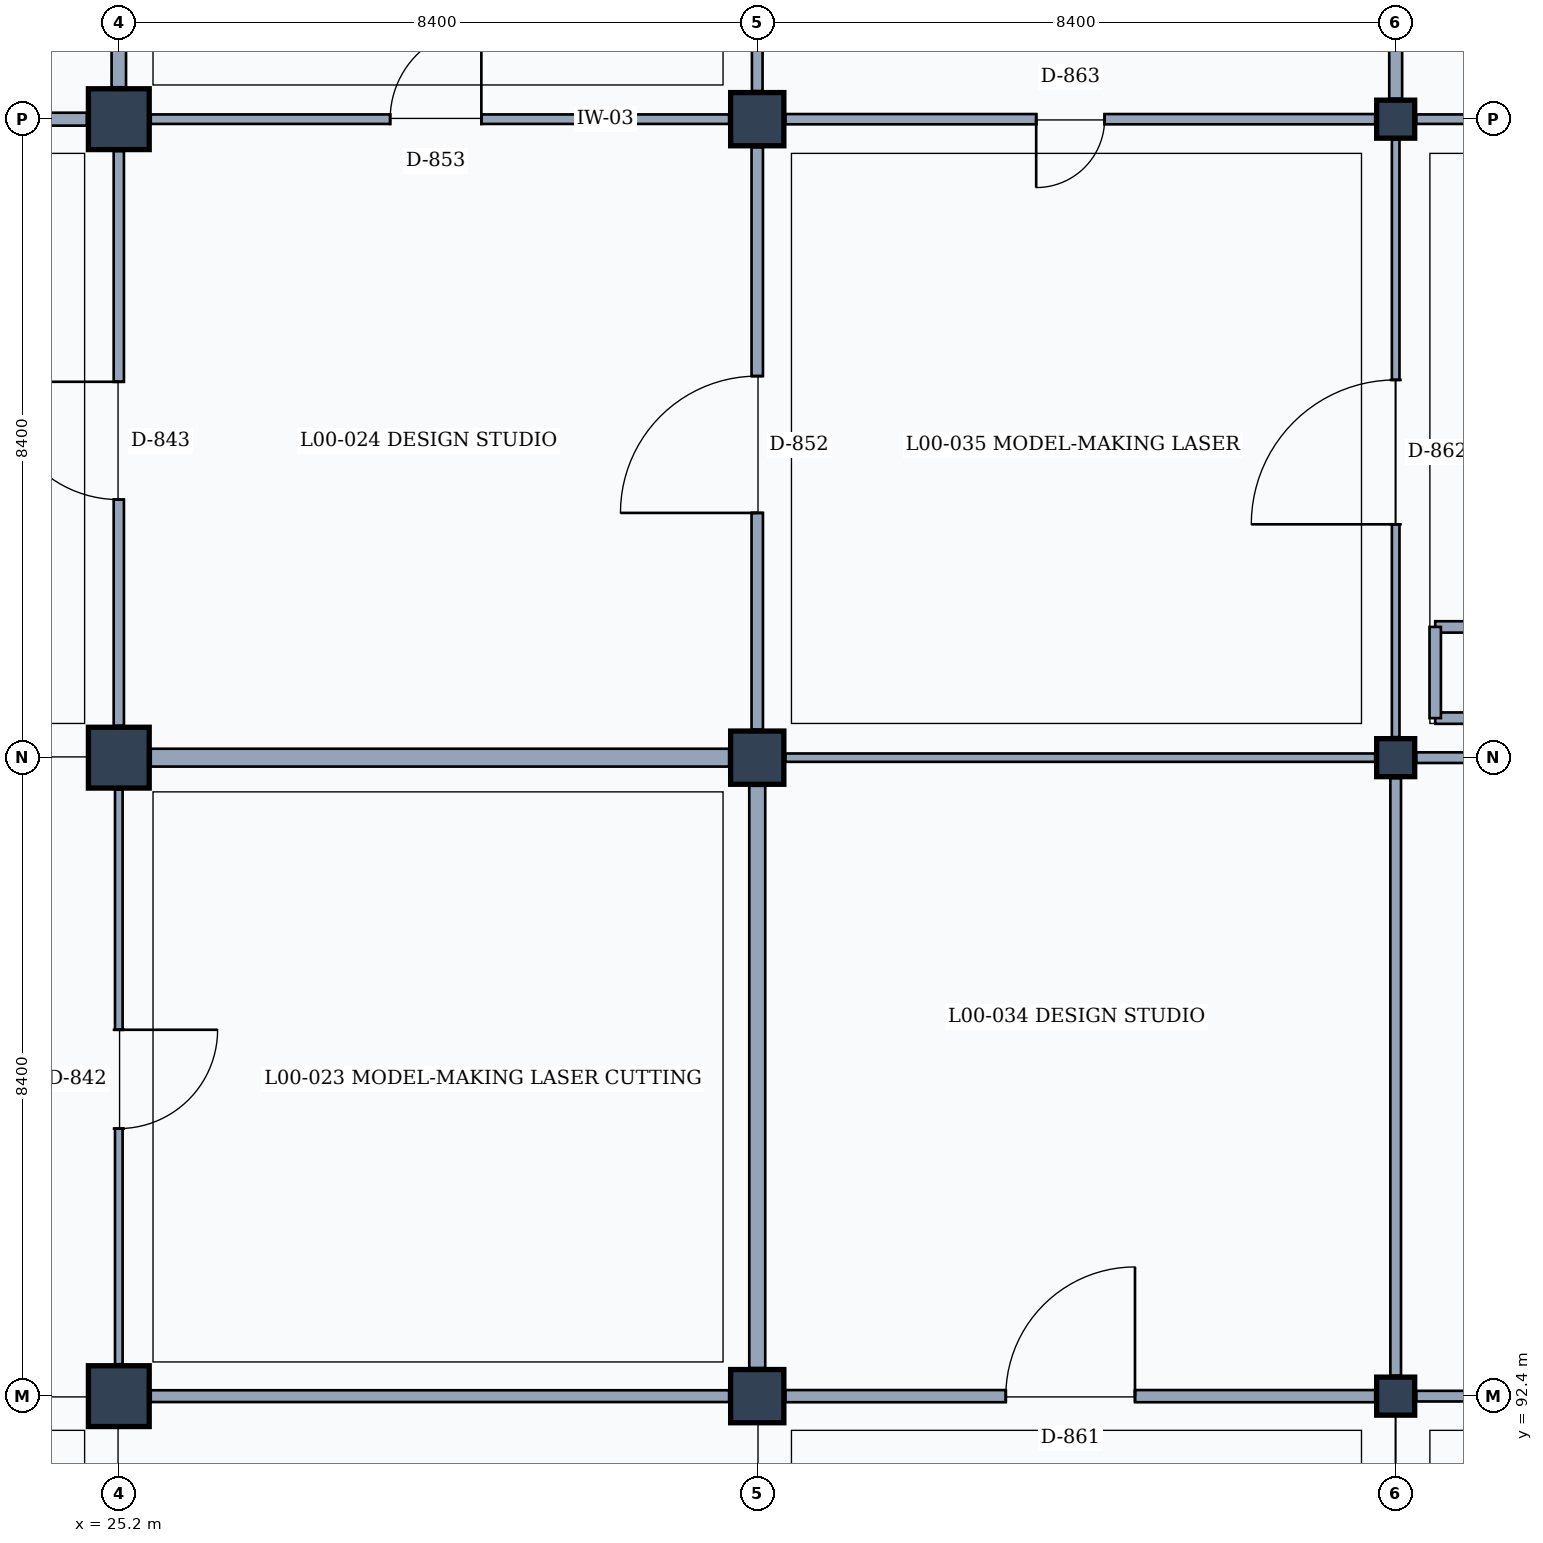
"""IFC4 building model, lengths in metres.
Left out: names, types, materials, properties, quantities, classifications, styles, units other than length and angle.
Written with IfcOpenShell. Run it as: python <this file> out.ifc"""

import sys

from ifc_helpers import new_model, si_unit, direction, frame, frame_2d, origin, origin_2d, place, context, subcontext, project, spatial, rectangle, extrude, element, fill, save


model = new_model("IFC4")
c1 = context("Model", 3, precision=1e-05, world=origin(), true_north=direction((0.0, 1.0)))
c2 = subcontext(c1, "Body", "Model", "MODEL_VIEW")
j1 = project(units=[si_unit("LENGTHUNIT", "METRE"), si_unit("PLANEANGLEUNIT", "RADIAN")], contexts=[c1])
p1 = place(None, origin())
s1 = spatial("IfcSite", under=j1, at=p1, CompositionType="ELEMENT")
p2 = place(p1, origin())
s2 = spatial("IfcBuilding", under=s1, at=p2, CompositionType="ELEMENT")
p3 = place(p2, origin())
s3 = spatial("IfcBuildingStorey", under=s2, at=p3, CompositionType="ELEMENT", Elevation=0.0)
for number, where, z_axis, x_axis in (
    (1, (25.2, 92.4, 0.0), (0.0, 0.0, 1.0), (1.0, 0.0, 0.0)),
    (2, (25.2, 100.8, 0.0), (0.0, 0.0, 1.0), (1.0, 0.0, 0.0)),
    (3, (25.2, 109.2, 0.0), (0.0, 0.0, 1.0), (1.0, 0.0, 0.0)),
):
    element("IfcColumn", number, at=place(p3, frame(where, z_axis=z_axis, x_axis=x_axis)), inside=s3, PredefinedType="COLUMN", context=c2, shape_type="SweptSolid", body=[
        extrude(rectangle(XDim=0.8, YDim=0.8, at=origin_2d()), origin(), (0.0, 0.0, 1.0), 4.8),
    ])
for number, where, z_axis, x_axis in (
    (4, (33.6, 92.4, 0.0), (0.0, 0.0, 1.0), (1.0, 0.0, 0.0)),
    (5, (33.6, 100.8, 0.0), (0.0, 0.0, 1.0), (1.0, 0.0, 0.0)),
    (6, (33.6, 109.2, 0.0), (0.0, 0.0, 1.0), (1.0, 0.0, 0.0)),
):
    element("IfcColumn", number, at=place(p3, frame(where, z_axis=z_axis, x_axis=x_axis)), inside=s3, PredefinedType="COLUMN", context=c2, shape_type="SweptSolid", body=[
        extrude(rectangle(XDim=0.7, YDim=0.7, at=origin_2d()), origin(), (0.0, 0.0, 1.0), 4.8),
    ])
for number, where, z_axis, x_axis in (
    (7, (42.0, 92.4, 0.0), (0.0, 0.0, 1.0), (1.0, 0.0, 0.0)),
    (8, (42.0, 100.8, 0.0), (0.0, 0.0, 1.0), (1.0, 0.0, 0.0)),
    (9, (42.0, 109.2, 0.0), (0.0, 0.0, 1.0), (1.0, 0.0, 0.0)),
):
    element("IfcColumn", number, at=place(p3, frame(where, z_axis=z_axis, x_axis=x_axis)), inside=s3, PredefinedType="COLUMN", context=c2, shape_type="SweptSolid", body=[
        extrude(rectangle(XDim=0.5, YDim=0.5, at=origin_2d()), origin(), (0.0, 0.0, 1.0), 4.8),
    ])
for number, where, z_axis, x_axis in (
    (10, (42.52, 101.32, 0.0), (0.0, 0.0, 1.0), (1.0, 0.0, 0.0)),
    (11, (43.72, 102.52, 0.0), (0.0, 0.0, 1.0), (-1.0, 0.0, 0.0)),
    (12, (42.52, 102.52, 0.0), (0.0, 0.0, 1.0), (0.0, -1.0, 0.0)),
):
    element("IfcWall", number, at=place(p3, frame(where, z_axis=z_axis, x_axis=x_axis)), inside=s3, PredefinedType="PARTITIONING", context=c2, shape_type="SweptSolid", body=[
        extrude(rectangle(XDim=1.2, YDim=0.15, at=frame_2d((0.6, 0.0))), origin(), (0.0, 0.0, 1.0), 4.55),
    ])
p4 = place(p3, frame((25.2, 92.82, 0.0), z_axis=(0.0, 0.0, 1.0), x_axis=(0.0, 1.0, 0.0)))
e13 = element("IfcWall", 13, at=p4, inside=s3, PredefinedType="MOVABLE", context=c2, shape_type="SweptSolid", body=[
    extrude(rectangle(XDim=7.56, YDim=0.1, at=frame_2d((3.78, 0.0))), origin(), (0.0, 0.0, 1.0), 3.92),
])
p5 = place(p4, frame((3.1, 0.0, 0.0)))
e14 = element("IfcOpeningElement", 14, at=p5, cuts=e13, PredefinedType="OPENING", context=c2, shape_type="SweptSolid", body=[
    extrude(rectangle(XDim=1.3, YDim=2.2, at=frame_2d((0.65, 1.1))), frame((0.0, 0.06, 0.0), z_axis=(0.0, -1.0, 0.0), x_axis=(1.0, 0.0, 0.0)), (0.0, 0.0, 1.0), 0.12),
])
p6 = place(p3, frame((25.2, 101.22, 0.0), z_axis=(0.0, 0.0, 1.0), x_axis=(0.0, 1.0, 0.0)))
e15 = element("IfcWall", 15, at=p6, inside=s3, PredefinedType="PARTITIONING", context=c2, shape_type="SweptSolid", body=[
    extrude(rectangle(XDim=7.56, YDim=0.135, at=frame_2d((3.78, 0.0))), origin(), (0.0, 0.0, 1.0), 3.92),
])
p7 = place(p6, frame((2.975, 0.0, 0.0)))
e16 = element("IfcOpeningElement", 16, at=p7, cuts=e15, PredefinedType="OPENING", context=c2, shape_type="SweptSolid", body=[
    extrude(rectangle(XDim=1.55, YDim=2.35, at=frame_2d((0.775, 1.175))), frame((0.0, 0.077, 0.0), z_axis=(0.0, -1.0, 0.0), x_axis=(1.0, 0.0, 0.0)), (0.0, 0.0, 1.0), 0.155),
])
p8 = place(p3, frame((17.245, 109.2, 0.0), z_axis=(0.0, 0.0, 1.0), x_axis=(1.0, 0.0, 0.0)))
e17 = element("IfcWall", 17, at=p8, inside=s3, PredefinedType="PARTITIONING", context=c2, shape_type="SweptSolid", body=[
    extrude(rectangle(XDim=7.535, YDim=0.17, at=frame_2d((3.768, 0.0))), origin(), (0.0, 0.0, 1.0), 3.87),
])
p9 = place(p8, frame((2.9, 0.0, 0.0)))
e18 = element("IfcOpeningElement", 18, at=p9, cuts=e17, PredefinedType="OPENING", context=c2, shape_type="SweptSolid", body=[
    extrude(rectangle(XDim=1.7, YDim=2.3, at=frame_2d((0.85, 1.15))), frame((0.0, 0.095, 0.0), z_axis=(0.0, -1.0, 0.0), x_axis=(1.0, 0.0, 0.0)), (0.0, 0.0, 1.0), 0.19),
])
p10 = place(p3, frame((25.2, 109.62, 0.0), z_axis=(0.0, 0.0, 1.0), x_axis=(0.0, 1.0, 0.0)))
e19 = element("IfcWall", 19, at=p10, inside=s3, PredefinedType="PARTITIONING", context=c2, shape_type="SweptSolid", body=[
    extrude(rectangle(XDim=7.56, YDim=0.19, at=frame_2d((3.78, 0.0))), origin(), (0.0, 0.0, 1.0), 3.92),
])
p11 = place(p3, frame((25.62, 92.4, 0.0), z_axis=(0.0, 0.0, 1.0), x_axis=(1.0, 0.0, 0.0)))
e20 = element("IfcWall", 20, at=p11, inside=s3, PredefinedType="PARTITIONING", context=c2, shape_type="SweptSolid", body=[
    extrude(rectangle(XDim=7.61, YDim=0.155, at=frame_2d((3.805, 0.0))), origin(), (0.0, 0.0, 1.0), 3.87),
])
p12 = place(p3, frame((33.6, 92.77, 0.0), z_axis=(0.0, 0.0, 1.0), x_axis=(0.0, 1.0, 0.0)))
e21 = element("IfcWall", 21, at=p12, inside=s3, PredefinedType="PARTITIONING", context=c2, shape_type="SweptSolid", body=[
    extrude(rectangle(XDim=7.66, YDim=0.21, at=frame_2d((3.83, 0.0))), origin(), (0.0, 0.0, 1.0), 3.92),
])
p13 = place(p3, frame((25.62, 100.8, 0.0), z_axis=(0.0, 0.0, 1.0), x_axis=(1.0, 0.0, 0.0)))
e22 = element("IfcWall", 22, at=p13, inside=s3, PredefinedType="PARTITIONING", context=c2, shape_type="SweptSolid", body=[
    extrude(rectangle(XDim=7.61, YDim=0.235, at=frame_2d((3.805, 0.0))), origin(), (0.0, 0.0, 1.0), 3.87),
])
p14 = place(p3, frame((33.6, 101.17, 0.0), z_axis=(0.0, 0.0, 1.0), x_axis=(0.0, 1.0, 0.0)))
e23 = element("IfcWall", 23, at=p14, inside=s3, PredefinedType="PARTITIONING", context=c2, shape_type="SweptSolid", body=[
    extrude(rectangle(XDim=7.66, YDim=0.15, at=frame_2d((3.83, 0.0))), origin(), (0.0, 0.0, 1.0), 3.92),
])
p15 = place(p14, frame((2.85, 0.0, 0.0)))
e24 = element("IfcOpeningElement", 24, at=p15, cuts=e23, PredefinedType="OPENING", context=c2, shape_type="SweptSolid", body=[
    extrude(rectangle(XDim=1.8, YDim=2.3, at=frame_2d((0.9, 1.15))), frame((0.0, 0.085, 0.0), z_axis=(0.0, -1.0, 0.0), x_axis=(1.0, 0.0, 0.0)), (0.0, 0.0, 1.0), 0.17),
])
p16 = place(p3, frame((25.62, 109.2, 0.0), z_axis=(0.0, 0.0, 1.0), x_axis=(1.0, 0.0, 0.0)))
e25 = element("IfcWall", 25, at=p16, inside=s3, PredefinedType="PARTITIONING", context=c2, shape_type="SweptSolid", body=[
    extrude(rectangle(XDim=7.61, YDim=0.125, at=frame_2d((3.805, 0.0))), origin(), (0.0, 0.0, 1.0), 3.87),
])
p17 = place(p16, frame((3.15, 0.0, 0.0)))
e26 = element("IfcOpeningElement", 26, at=p17, cuts=e25, PredefinedType="OPENING", context=c2, shape_type="SweptSolid", body=[
    extrude(rectangle(XDim=1.2, YDim=2.2, at=frame_2d((0.6, 1.1))), frame((0.0, 0.073, 0.0), z_axis=(0.0, -1.0, 0.0), x_axis=(1.0, 0.0, 0.0)), (0.0, 0.0, 1.0), 0.145),
])
p18 = place(p3, frame((33.6, 109.57, 0.0), z_axis=(0.0, 0.0, 1.0), x_axis=(0.0, 1.0, 0.0)))
e27 = element("IfcWall", 27, at=p18, inside=s3, PredefinedType="PARTITIONING", context=c2, shape_type="SweptSolid", body=[
    extrude(rectangle(XDim=7.66, YDim=0.14, at=frame_2d((3.83, 0.0))), origin(), (0.0, 0.0, 1.0), 3.92),
])
p19 = place(p3, frame((33.97, 92.4, 0.0), z_axis=(0.0, 0.0, 1.0), x_axis=(1.0, 0.0, 0.0)))
e28 = element("IfcWall", 28, at=p19, inside=s3, PredefinedType="PARTITIONING", context=c2, shape_type="SweptSolid", body=[
    extrude(rectangle(XDim=7.76, YDim=0.16, at=frame_2d((3.88, 0.0))), origin(), (0.0, 0.0, 1.0), 3.87),
])
p20 = place(p19, frame((2.9, 0.0, 0.0)))
e29 = element("IfcOpeningElement", 29, at=p20, cuts=e28, PredefinedType="OPENING", context=c2, shape_type="SweptSolid", body=[
    extrude(rectangle(XDim=1.7, YDim=2.3, at=frame_2d((0.85, 1.15))), frame((0.0, 0.09, 0.0), z_axis=(0.0, -1.0, 0.0), x_axis=(1.0, 0.0, 0.0)), (0.0, 0.0, 1.0), 0.18),
])
p21 = place(p3, frame((42.0, 92.67, 0.0), z_axis=(0.0, 0.0, 1.0), x_axis=(0.0, 1.0, 0.0)))
e30 = element("IfcWall", 30, at=p21, inside=s3, PredefinedType="PARTITIONING", context=c2, shape_type="SweptSolid", body=[
    extrude(rectangle(XDim=7.86, YDim=0.14, at=frame_2d((3.93, 0.0))), origin(), (0.0, 0.0, 1.0), 3.92),
])
p22 = place(p3, frame((33.97, 100.8, 0.0), z_axis=(0.0, 0.0, 1.0), x_axis=(1.0, 0.0, 0.0)))
e31 = element("IfcWall", 31, at=p22, inside=s3, PredefinedType="PARTITIONING", context=c2, shape_type="SweptSolid", body=[
    extrude(rectangle(XDim=7.76, YDim=0.11, at=frame_2d((3.88, 0.0))), origin(), (0.0, 0.0, 1.0), 3.87),
])
p23 = place(p3, frame((42.0, 101.07, 0.0), z_axis=(0.0, 0.0, 1.0), x_axis=(0.0, 1.0, 0.0)))
e32 = element("IfcWall", 32, at=p23, inside=s3, PredefinedType="MOVABLE", context=c2, shape_type="SweptSolid", body=[
    extrude(rectangle(XDim=7.86, YDim=0.1, at=frame_2d((3.93, 0.0))), origin(), (0.0, 0.0, 1.0), 3.92),
])
p24 = place(p23, frame((2.8, 0.0, 0.0)))
e33 = element("IfcOpeningElement", 33, at=p24, cuts=e32, PredefinedType="OPENING", context=c2, shape_type="SweptSolid", body=[
    extrude(rectangle(XDim=1.9, YDim=2.4, at=frame_2d((0.95, 1.2))), frame((0.0, 0.06, 0.0), z_axis=(0.0, -1.0, 0.0), x_axis=(1.0, 0.0, 0.0)), (0.0, 0.0, 1.0), 0.12),
])
p25 = place(p3, frame((33.97, 109.2, 0.0), z_axis=(0.0, 0.0, 1.0), x_axis=(1.0, 0.0, 0.0)))
e34 = element("IfcWall", 34, at=p25, inside=s3, PredefinedType="PARTITIONING", context=c2, shape_type="SweptSolid", body=[
    extrude(rectangle(XDim=7.76, YDim=0.135, at=frame_2d((3.88, 0.0))), origin(), (0.0, 0.0, 1.0), 3.87),
])
p26 = place(p25, frame((3.3, 0.0, 0.0)))
e35 = element("IfcOpeningElement", 35, at=p26, cuts=e34, PredefinedType="OPENING", context=c2, shape_type="SweptSolid", body=[
    extrude(rectangle(XDim=0.9, YDim=2.1, at=frame_2d((0.45, 1.05))), frame((0.0, 0.077, 0.0), z_axis=(0.0, -1.0, 0.0), x_axis=(1.0, 0.0, 0.0)), (0.0, 0.0, 1.0), 0.155),
])
p27 = place(p3, frame((42.0, 109.47, 0.0), z_axis=(0.0, 0.0, 1.0), x_axis=(0.0, 1.0, 0.0)))
e36 = element("IfcWall", 36, at=p27, inside=s3, PredefinedType="PARTITIONING", context=c2, shape_type="SweptSolid", body=[
    extrude(rectangle(XDim=7.86, YDim=0.17, at=frame_2d((3.93, 0.0))), origin(), (0.0, 0.0, 1.0), 3.92),
])
p28 = place(p3, frame((42.27, 92.4, 0.0), z_axis=(0.0, 0.0, 1.0), x_axis=(1.0, 0.0, 0.0)))
e37 = element("IfcWall", 37, at=p28, inside=s3, PredefinedType="PARTITIONING", context=c2, shape_type="SweptSolid", body=[
    extrude(rectangle(XDim=7.685, YDim=0.14, at=frame_2d((3.843, 0.0))), origin(), (0.0, 0.0, 1.0), 3.86),
])
p29 = place(p28, frame((3.275, 0.0, 0.0)))
e38 = element("IfcOpeningElement", 38, at=p29, cuts=e37, PredefinedType="OPENING", context=c2, shape_type="SweptSolid", body=[
    extrude(rectangle(XDim=0.95, YDim=2.15, at=frame_2d((0.475, 1.075))), frame((0.0, 0.08, 0.0), z_axis=(0.0, -1.0, 0.0), x_axis=(1.0, 0.0, 0.0)), (0.0, 0.0, 1.0), 0.16),
])
p30 = place(p3, frame((42.27, 100.8, 0.0), z_axis=(0.0, 0.0, 1.0), x_axis=(1.0, 0.0, 0.0)))
e39 = element("IfcWall", 39, at=p30, inside=s3, PredefinedType="PARTITIONING", context=c2, shape_type="SweptSolid", body=[
    extrude(rectangle(XDim=7.685, YDim=0.14, at=frame_2d((3.843, 0.0))), origin(), (0.0, 0.0, 1.0), 3.86),
])
p31 = place(p3, frame((42.27, 109.2, 0.0), z_axis=(0.0, 0.0, 1.0), x_axis=(1.0, 0.0, 0.0)))
e40 = element("IfcWall", 40, at=p31, inside=s3, PredefinedType="PARTITIONING", context=c2, shape_type="SweptSolid", body=[
    extrude(rectangle(XDim=7.81, YDim=0.125, at=frame_2d((3.905, 0.0))), origin(), (0.0, 0.0, 1.0), 3.86),
])
p32 = place(p31, frame((3.275, 0.0, 0.0)))
e41 = element("IfcOpeningElement", 41, at=p32, cuts=e40, PredefinedType="OPENING", context=c2, shape_type="SweptSolid", body=[
    extrude(rectangle(XDim=0.95, YDim=2.15, at=frame_2d((0.475, 1.075))), frame((0.0, 0.073, 0.0), z_axis=(0.0, -1.0, 0.0), x_axis=(1.0, 0.0, 0.0)), (0.0, 0.0, 1.0), 0.145),
])
p33 = place(p5, frame((1.3, 0.0, 0.0), z_axis=(0.0, 0.0, 1.0), x_axis=(-1.0, 0.0, 0.0)))
e42 = element("IfcDoor", 42, at=p33, inside=s3, OperationType="SINGLE_SWING_LEFT", PredefinedType="DOOR", context=c2, shape_type="SweptSolid", body=[
    extrude(rectangle(XDim=1.3, YDim=2.2, at=frame_2d((0.65, 1.1))), frame((0.0, 0.025, 0.0), z_axis=(0.0, -1.0, 0.0), x_axis=(1.0, 0.0, 0.0)), (0.0, 0.0, 1.0), 0.05),
])
fill(e14, e42)
p34 = place(p7, origin())
e43 = element("IfcDoor", 43, at=p34, inside=s3, OperationType="SINGLE_SWING_RIGHT", PredefinedType="DOOR", context=c2, shape_type="SweptSolid", body=[
    extrude(rectangle(XDim=1.55, YDim=2.35, at=frame_2d((0.775, 1.175))), frame((0.0, 0.025, 0.0), z_axis=(0.0, -1.0, 0.0), x_axis=(1.0, 0.0, 0.0)), (0.0, 0.0, 1.0), 0.05),
])
fill(e16, e43)
p35 = place(p15, origin())
e44 = element("IfcDoor", 44, at=p35, inside=s3, OperationType="SINGLE_SWING_LEFT", PredefinedType="DOOR", context=c2, shape_type="SweptSolid", body=[
    extrude(rectangle(XDim=1.8, YDim=2.3, at=frame_2d((0.9, 1.15))), frame((0.0, 0.025, 0.0), z_axis=(0.0, -1.0, 0.0), x_axis=(1.0, 0.0, 0.0)), (0.0, 0.0, 1.0), 0.05),
])
fill(e24, e44)
p36 = place(p17, origin())
e45 = element("IfcDoor", 45, at=p36, inside=s3, OperationType="SINGLE_SWING_RIGHT", PredefinedType="DOOR", context=c2, shape_type="SweptSolid", body=[
    extrude(rectangle(XDim=1.2, YDim=2.2, at=frame_2d((0.6, 1.1))), frame((0.0, 0.025, 0.0), z_axis=(0.0, -1.0, 0.0), x_axis=(1.0, 0.0, 0.0)), (0.0, 0.0, 1.0), 0.05),
])
fill(e26, e45)
p37 = place(p20, origin())
e46 = element("IfcDoor", 46, at=p37, inside=s3, OperationType="SINGLE_SWING_RIGHT", PredefinedType="DOOR", context=c2, shape_type="SweptSolid", body=[
    extrude(rectangle(XDim=1.7, YDim=2.3, at=frame_2d((0.85, 1.15))), frame((0.0, 0.025, 0.0), z_axis=(0.0, -1.0, 0.0), x_axis=(1.0, 0.0, 0.0)), (0.0, 0.0, 1.0), 0.05),
])
fill(e29, e46)
p38 = place(p24, origin())
e47 = element("IfcDoor", 47, at=p38, inside=s3, OperationType="SINGLE_SWING_LEFT", PredefinedType="DOOR", context=c2, shape_type="SweptSolid", body=[
    extrude(rectangle(XDim=1.9, YDim=2.4, at=frame_2d((0.95, 1.2))), frame((0.0, 0.025, 0.0), z_axis=(0.0, -1.0, 0.0), x_axis=(1.0, 0.0, 0.0)), (0.0, 0.0, 1.0), 0.05),
])
fill(e33, e47)
p39 = place(p26, frame((0.9, 0.0, 0.0), z_axis=(0.0, 0.0, 1.0), x_axis=(-1.0, 0.0, 0.0)))
e48 = element("IfcDoor", 48, at=p39, inside=s3, OperationType="SINGLE_SWING_RIGHT", PredefinedType="DOOR", context=c2, shape_type="SweptSolid", body=[
    extrude(rectangle(XDim=0.9, YDim=2.1, at=frame_2d((0.45, 1.05))), frame((0.0, 0.025, 0.0), z_axis=(0.0, -1.0, 0.0), x_axis=(1.0, 0.0, 0.0)), (0.0, 0.0, 1.0), 0.05),
])
fill(e35, e48)
save(model, sys.argv[1])
